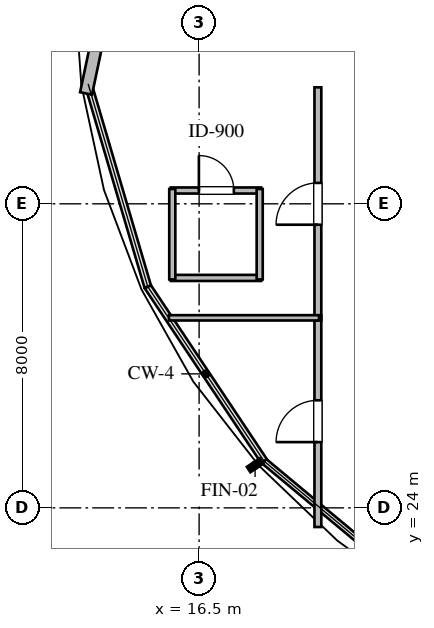
"""IFC4 building model, lengths in metres.
Left out: names, types, materials, properties, quantities, classifications, styles, units other than length and angle.
Written with IfcOpenShell. Run it as: python <this file> out.ifc"""

import sys

from ifc_helpers import new_model, si_unit, direction, frame, frame_2d, origin, place, context, subcontext, project, spatial, rectangle, extrude, element, fill, save


model = new_model("IFC4")
c1 = context("Model", 3, precision=1e-05, world=origin(), true_north=direction((0.0, 1.0)))
c2 = subcontext(c1, "Body", "Model", "MODEL_VIEW")
j1 = project(units=[si_unit("LENGTHUNIT", "METRE"), si_unit("PLANEANGLEUNIT", "RADIAN")], contexts=[c1])
p1 = place(None, origin())
s1 = spatial("IfcSite", under=j1, at=p1, CompositionType="ELEMENT")
p2 = place(p1, origin())
s2 = spatial("IfcBuilding", under=s1, at=p2, CompositionType="ELEMENT")
p3 = place(p2, frame((0.0, 0.0, 195.6)))
s3 = spatial("IfcBuildingStorey", under=s2, at=p3, CompositionType="ELEMENT", Elevation=195.6)
p4 = place(p3, frame((13.525, 34.903, 0.0), z_axis=(0.0, 0.0, 1.0), x_axis=(0.206301080321, 0.978488561128, 0.0)))
e1 = element("IfcWall", 1, at=p4, inside=s3, PredefinedType="STANDARD", context=c2, shape_type="SweptSolid", body=[
    extrude(rectangle(XDim=14.819, YDim=0.32, at=frame_2d((7.409, 0.0))), origin(), (0.0, 0.0, 1.0), 2.817),
])
p5 = place(p3, frame((15.754, 30.05, 0.0), z_axis=(0.0, 0.0, 1.0), x_axis=(1.0, 0.0, 0.0)))
e2 = element("IfcWall", 2, at=p5, inside=s3, PredefinedType="PLUMBINGWALL", context=c2, shape_type="SweptSolid", body=[
    extrude(rectangle(XDim=2.38, YDim=0.16, at=frame_2d((1.19, 0.0))), origin(), (0.0, 0.0, 1.0), 3.36),
])
p6 = place(p3, frame((15.754, 32.35, 0.0), z_axis=(0.0, 0.0, 1.0), x_axis=(1.0, 0.0, 0.0)))
e3 = element("IfcWall", 3, at=p6, inside=s3, PredefinedType="PLUMBINGWALL", context=c2, shape_type="SweptSolid", body=[
    extrude(rectangle(XDim=2.38, YDim=0.16, at=frame_2d((1.19, 0.0))), origin(), (0.0, 0.0, 1.0), 3.36),
])
p7 = place(p6, frame((0.74, 0.0, 0.0)))
e4 = element("IfcOpeningElement", 4, at=p7, cuts=e3, PredefinedType="OPENING", context=c2, shape_type="SweptSolid", body=[
    extrude(rectangle(XDim=0.92, YDim=2.1, at=frame_2d((0.46, 1.05))), frame((0.0, 0.09, 0.0), z_axis=(0.0, -1.0, 0.0), x_axis=(1.0, 0.0, 0.0)), (0.0, 0.0, 1.0), 0.18),
])
p8 = place(p3, frame((15.794, 30.01, 0.0), z_axis=(0.0, 0.0, 1.0), x_axis=(0.0, 1.0, 0.0)))
e5 = element("IfcWall", 5, at=p8, inside=s3, PredefinedType="PLUMBINGWALL", context=c2, shape_type="SweptSolid", body=[
    extrude(rectangle(XDim=2.38, YDim=0.16, at=frame_2d((1.19, 0.0))), origin(), (0.0, 0.0, 1.0), 3.36),
])
p9 = place(p3, frame((18.094, 30.01, 0.0), z_axis=(0.0, 0.0, 1.0), x_axis=(0.0, 1.0, 0.0)))
e6 = element("IfcWall", 6, at=p9, inside=s3, PredefinedType="PLUMBINGWALL", context=c2, shape_type="SweptSolid", body=[
    extrude(rectangle(XDim=2.38, YDim=0.16, at=frame_2d((1.19, 0.0))), origin(), (0.0, 0.0, 1.0), 2.817),
])
p10 = place(p3, frame((19.625, 23.496, 0.0), z_axis=(0.0, 0.0, 1.0), x_axis=(0.0, 1.0, 0.0)))
e7 = element("IfcWall", 7, at=p10, inside=s3, PredefinedType="PARTITIONING", context=c2, shape_type="SweptSolid", body=[
    extrude(rectangle(XDim=5.569, YDim=0.18, at=frame_2d((2.784, 0.0))), origin(), (0.0, 0.0, 1.0), 2.817),
])
p11 = place(p10, frame((2.234, 0.0, 0.0)))
e8 = element("IfcOpeningElement", 8, at=p11, cuts=e7, PredefinedType="OPENING", context=c2, shape_type="SweptSolid", body=[
    extrude(rectangle(XDim=1.1, YDim=2.1, at=frame_2d((0.55, 1.05))), frame((0.0, 0.1, 0.0), z_axis=(0.0, -1.0, 0.0), x_axis=(1.0, 0.0, 0.0)), (0.0, 0.0, 1.0), 0.2),
])
p12 = place(p3, frame((19.625, 28.935, 0.0), z_axis=(0.0, 0.0, 1.0), x_axis=(0.0, 1.0, 0.0)))
e9 = element("IfcWall", 9, at=p12, inside=s3, PredefinedType="PARTITIONING", context=c2, shape_type="SweptSolid", body=[
    extrude(rectangle(XDim=6.13, YDim=0.18, at=frame_2d((3.065, 0.0))), origin(), (0.0, 0.0, 1.0), 3.36),
])
p13 = place(p12, frame((2.515, 0.0, 0.0)))
e10 = element("IfcOpeningElement", 10, at=p13, cuts=e9, PredefinedType="OPENING", context=c2, shape_type="SweptSolid", body=[
    extrude(rectangle(XDim=1.1, YDim=2.1, at=frame_2d((0.55, 1.05))), frame((0.0, 0.1, 0.0), z_axis=(0.0, -1.0, 0.0), x_axis=(1.0, 0.0, 0.0)), (0.0, 0.0, 1.0), 0.2),
])
p14 = place(p3, frame((15.705, 29.0, 0.0), z_axis=(0.0, 0.0, 1.0), x_axis=(1.0, 0.0, 0.0)))
e11 = element("IfcWall", 11, at=p14, inside=s3, PredefinedType="PARTITIONING", context=c2, shape_type="SweptSolid", body=[
    extrude(rectangle(XDim=3.95, YDim=0.14, at=frame_2d((1.975, 0.0))), origin(), (0.0, 0.0, 1.0), 3.36),
])
p15 = place(p7, origin())
e12 = element("IfcDoor", 12, at=p15, inside=s3, OperationType="SINGLE_SWING_LEFT", PredefinedType="DOOR", context=c2, shape_type="SweptSolid", body=[
    extrude(rectangle(XDim=0.92, YDim=2.1, at=frame_2d((0.46, 1.05))), frame((0.0, 0.025, 0.0), z_axis=(0.0, -1.0, 0.0), x_axis=(1.0, 0.0, 0.0)), (0.0, 0.0, 1.0), 0.05),
])
fill(e4, e12)
p16 = place(p11, origin())
e13 = element("IfcDoor", 13, at=p16, inside=s3, OperationType="SINGLE_SWING_LEFT", PredefinedType="DOOR", context=c2, shape_type="SweptSolid", body=[
    extrude(rectangle(XDim=1.1, YDim=2.1, at=frame_2d((0.55, 1.05))), frame((0.0, 0.025, 0.0), z_axis=(0.0, -1.0, 0.0), x_axis=(1.0, 0.0, 0.0)), (0.0, 0.0, 1.0), 0.05),
])
fill(e8, e13)
p17 = place(p13, origin())
e14 = element("IfcDoor", 14, at=p17, inside=s3, OperationType="SINGLE_SWING_LEFT", PredefinedType="DOOR", context=c2, shape_type="SweptSolid", body=[
    extrude(rectangle(XDim=1.1, YDim=2.1, at=frame_2d((0.55, 1.05))), frame((0.0, 0.025, 0.0), z_axis=(0.0, -1.0, 0.0), x_axis=(1.0, 0.0, 0.0)), (0.0, 0.0, 1.0), 0.05),
])
fill(e10, e14)
save(model, sys.argv[1])
